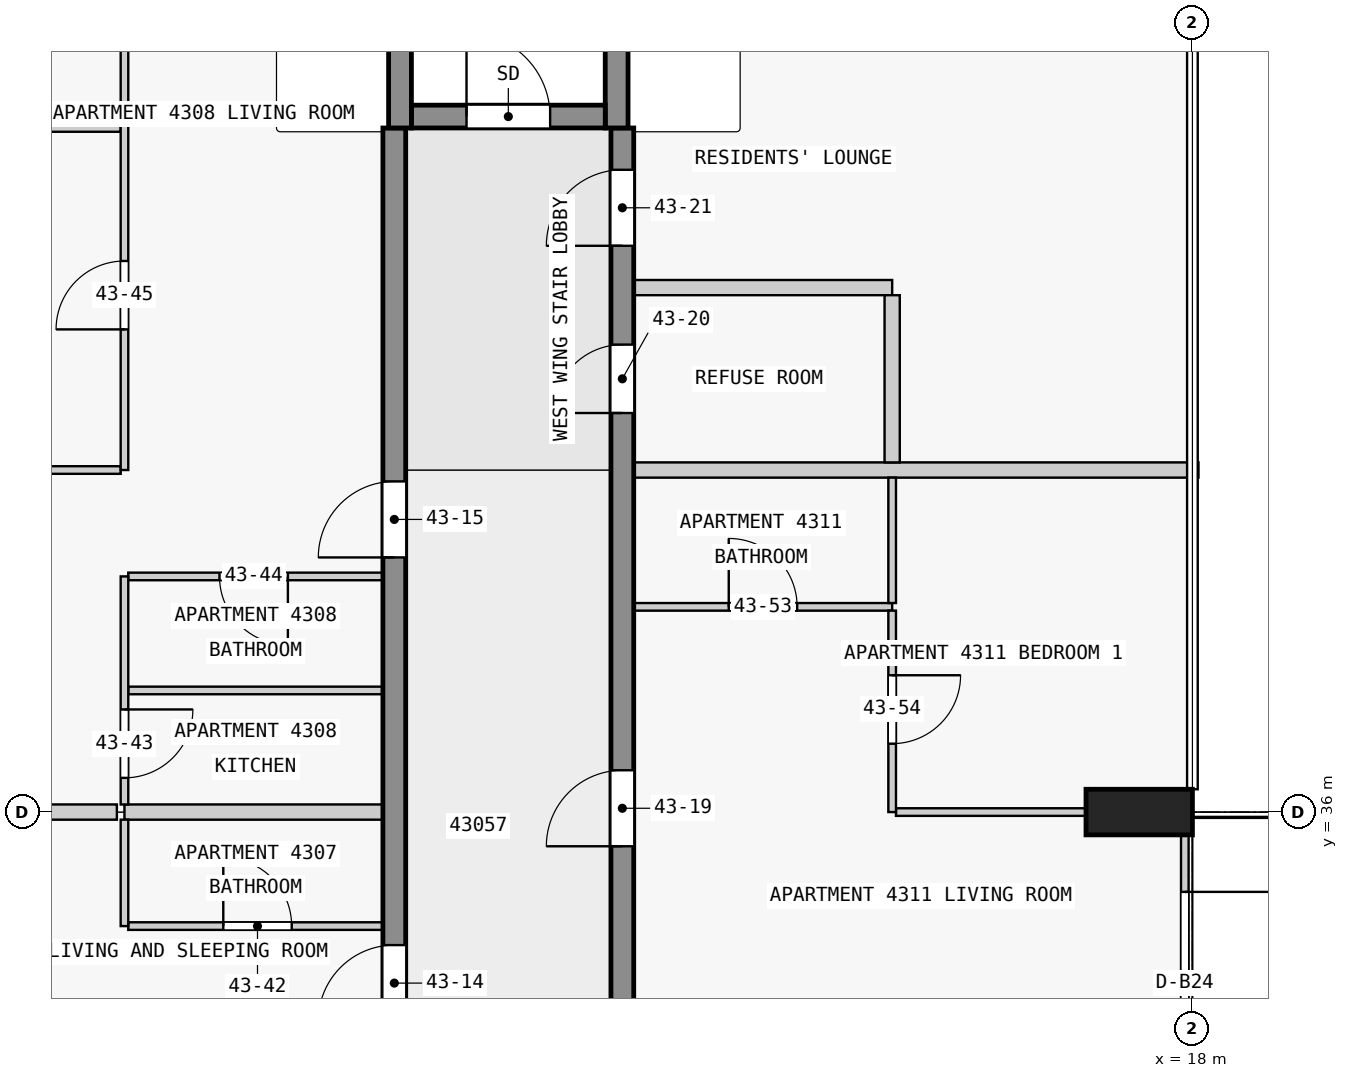
"""IFC4 building model, lengths in metres.
Left out: names, types, materials, properties, quantities, classifications, styles, units other than length and angle.
Written with IfcOpenShell. Run it as: python <this file> out.ifc"""

import sys

from ifc_helpers import new_model, si_unit, direction, frame, frame_2d, origin, origin_2d, place, context, subcontext, project, spatial, rectangle, extrude, element, fill, save


model = new_model("IFC4")
c1 = context("Model", 3, precision=1e-05, world=origin(), true_north=direction((0.0, 1.0)))
c2 = subcontext(c1, "Body", "Model", "MODEL_VIEW")
j1 = project(units=[si_unit("LENGTHUNIT", "METRE"), si_unit("PLANEANGLEUNIT", "RADIAN")], contexts=[c1])
p1 = place(None, origin())
s1 = spatial("IfcSite", under=j1, at=p1, CompositionType="ELEMENT")
p2 = place(p1, origin())
s2 = spatial("IfcBuilding", under=s1, at=p2, CompositionType="ELEMENT")
p3 = place(p2, frame((0.0, 0.0, 167.4)))
s3 = spatial("IfcBuildingStorey", under=s2, at=p3, CompositionType="ELEMENT", Elevation=167.4)
p4 = place(p3, frame((17.3, 36.0, 0.0), z_axis=(0.0, 0.0, 1.0), x_axis=(0.0, 1.0, 0.0)))
e1 = element("IfcColumn", 1, at=p4, inside=s3, PredefinedType="COLUMN", context=c2, shape_type="SweptSolid", body=[
    extrude(rectangle(XDim=0.6, YDim=1.4, at=origin_2d()), origin(), (0.0, 0.0, 1.0), 3.5),
])
p5 = place(p3, frame((7.725, 45.15, 0.0), z_axis=(0.0, 0.0, 1.0), x_axis=(1.0, 0.0, 0.0)))
e2 = element("IfcWall", 2, at=p5, inside=s3, PredefinedType="SHEAR", context=c2, shape_type="SweptSolid", body=[
    extrude(rectangle(XDim=2.55, YDim=0.3, at=frame_2d((1.275, 0.0))), origin(), (0.0, 0.0, 1.0), 3.5),
])
p6 = place(p5, frame((0.725, 0.0, 0.0)))
e3 = element("IfcOpeningElement", 3, at=p6, cuts=e2, PredefinedType="OPENING", context=c2, shape_type="SweptSolid", body=[
    extrude(rectangle(XDim=1.1, YDim=2.1, at=frame_2d((0.55, 1.05))), frame((0.0, 0.16, 0.0), z_axis=(0.0, -1.0, 0.0), x_axis=(1.0, 0.0, 0.0)), (0.0, 0.0, 1.0), 0.32),
])
for number, where, z_axis, x_axis in (
    (4, (7.575, 45.0, 0.0), (0.0, 0.0, 1.0), (0.0, 1.0, 0.0)),
    (5, (10.425, 45.0, 0.0), (0.0, 0.0, 1.0), (0.0, 1.0, 0.0)),
):
    element("IfcWall", number, at=place(p3, frame(where, z_axis=z_axis, x_axis=x_axis)), inside=s3, PredefinedType="SHEAR", context=c2, shape_type="SweptSolid", body=[
        extrude(rectangle(XDim=7.2, YDim=0.3, at=frame_2d((3.6, 0.0))), origin(), (0.0, 0.0, 1.0), 3.5),
    ])
p7 = place(p3, frame((7.5, 18.0, 0.0), z_axis=(0.0, 0.0, 1.0), x_axis=(0.0, 1.0, 0.0)))
e6 = element("IfcWall", 6, at=p7, inside=s3, PredefinedType="SHEAR", context=c2, shape_type="SweptSolid", body=[
    extrude(rectangle(XDim=27.0, YDim=0.3, at=frame_2d((13.5, 0.0))), origin(), (0.0, 0.0, 1.0), 3.25),
])
p8 = place(p7, frame((1.75, 0.0, 0.0)))
e7 = element("IfcOpeningElement", 7, at=p8, cuts=e6, PredefinedType="OPENING", context=c2, shape_type="SweptSolid", body=[
    extrude(rectangle(XDim=1.0, YDim=2.1, at=frame_2d((0.5, 1.05))), frame((0.0, 0.16, 0.0), z_axis=(0.0, -1.0, 0.0), x_axis=(1.0, 0.0, 0.0)), (0.0, 0.0, 1.0), 0.32),
])
p9 = place(p7, frame((6.25, 0.0, 0.0)))
e8 = element("IfcOpeningElement", 8, at=p9, cuts=e6, PredefinedType="OPENING", context=c2, shape_type="SweptSolid", body=[
    extrude(rectangle(XDim=1.0, YDim=2.1, at=frame_2d((0.5, 1.05))), frame((0.0, 0.16, 0.0), z_axis=(0.0, -1.0, 0.0), x_axis=(1.0, 0.0, 0.0)), (0.0, 0.0, 1.0), 0.32),
])
p10 = place(p7, frame((10.75, 0.0, 0.0)))
e9 = element("IfcOpeningElement", 9, at=p10, cuts=e6, PredefinedType="OPENING", context=c2, shape_type="SweptSolid", body=[
    extrude(rectangle(XDim=1.0, YDim=2.1, at=frame_2d((0.5, 1.05))), frame((0.0, 0.16, 0.0), z_axis=(0.0, -1.0, 0.0), x_axis=(1.0, 0.0, 0.0)), (0.0, 0.0, 1.0), 0.32),
])
p11 = place(p7, frame((15.25, 0.0, 0.0)))
e10 = element("IfcOpeningElement", 10, at=p11, cuts=e6, PredefinedType="OPENING", context=c2, shape_type="SweptSolid", body=[
    extrude(rectangle(XDim=1.0, YDim=2.1, at=frame_2d((0.5, 1.05))), frame((0.0, 0.16, 0.0), z_axis=(0.0, -1.0, 0.0), x_axis=(1.0, 0.0, 0.0)), (0.0, 0.0, 1.0), 0.32),
])
p12 = place(p7, frame((21.35, 0.0, 0.0)))
e11 = element("IfcOpeningElement", 11, at=p12, cuts=e6, PredefinedType="OPENING", context=c2, shape_type="SweptSolid", body=[
    extrude(rectangle(XDim=1.0, YDim=2.1, at=frame_2d((0.5, 1.05))), frame((0.0, 0.16, 0.0), z_axis=(0.0, -1.0, 0.0), x_axis=(1.0, 0.0, 0.0)), (0.0, 0.0, 1.0), 0.32),
])
p13 = place(p3, frame((10.5, 18.0, 0.0), z_axis=(0.0, 0.0, 1.0), x_axis=(0.0, 1.0, 0.0)))
e12 = element("IfcWall", 12, at=p13, inside=s3, PredefinedType="SHEAR", context=c2, shape_type="SweptSolid", body=[
    extrude(rectangle(XDim=27.0, YDim=0.3, at=frame_2d((13.5, 0.0))), origin(), (0.0, 0.0, 1.0), 3.25),
])
p14 = place(p13, frame((1.75, 0.0, 0.0)))
e13 = element("IfcOpeningElement", 13, at=p14, cuts=e12, PredefinedType="OPENING", context=c2, shape_type="SweptSolid", body=[
    extrude(rectangle(XDim=1.0, YDim=2.1, at=frame_2d((0.5, 1.05))), frame((0.0, 0.16, 0.0), z_axis=(0.0, -1.0, 0.0), x_axis=(1.0, 0.0, 0.0)), (0.0, 0.0, 1.0), 0.32),
])
p15 = place(p13, frame((6.25, 0.0, 0.0)))
e14 = element("IfcOpeningElement", 14, at=p15, cuts=e12, PredefinedType="OPENING", context=c2, shape_type="SweptSolid", body=[
    extrude(rectangle(XDim=1.0, YDim=2.1, at=frame_2d((0.5, 1.05))), frame((0.0, 0.16, 0.0), z_axis=(0.0, -1.0, 0.0), x_axis=(1.0, 0.0, 0.0)), (0.0, 0.0, 1.0), 0.32),
])
p16 = place(p13, frame((10.35, 0.0, 0.0)))
e15 = element("IfcOpeningElement", 15, at=p16, cuts=e12, PredefinedType="OPENING", context=c2, shape_type="SweptSolid", body=[
    extrude(rectangle(XDim=1.8, YDim=2.1, at=frame_2d((0.9, 1.05))), frame((0.0, 0.16, 0.0), z_axis=(0.0, -1.0, 0.0), x_axis=(1.0, 0.0, 0.0)), (0.0, 0.0, 1.0), 0.32),
])
p17 = place(p13, frame((17.55, 0.0, 0.0)))
e16 = element("IfcOpeningElement", 16, at=p17, cuts=e12, PredefinedType="OPENING", context=c2, shape_type="SweptSolid", body=[
    extrude(rectangle(XDim=1.0, YDim=2.1, at=frame_2d((0.5, 1.05))), frame((0.0, 0.16, 0.0), z_axis=(0.0, -1.0, 0.0), x_axis=(1.0, 0.0, 0.0)), (0.0, 0.0, 1.0), 0.32),
])
p18 = place(p13, frame((23.25, 0.0, 0.0)))
e17 = element("IfcOpeningElement", 17, at=p18, cuts=e12, PredefinedType="OPENING", context=c2, shape_type="SweptSolid", body=[
    extrude(rectangle(XDim=0.9, YDim=2.1, at=frame_2d((0.45, 1.05))), frame((0.0, 0.16, 0.0), z_axis=(0.0, -1.0, 0.0), x_axis=(1.0, 0.0, 0.0)), (0.0, 0.0, 1.0), 0.32),
])
p19 = place(p13, frame((25.45, 0.0, 0.0)))
e18 = element("IfcOpeningElement", 18, at=p19, cuts=e12, PredefinedType="OPENING", context=c2, shape_type="SweptSolid", body=[
    extrude(rectangle(XDim=1.0, YDim=2.1, at=frame_2d((0.5, 1.05))), frame((0.0, 0.16, 0.0), z_axis=(0.0, -1.0, 0.0), x_axis=(1.0, 0.0, 0.0)), (0.0, 0.0, 1.0), 0.32),
])
p20 = place(p3, frame((17.9, 36.0, 0.0), z_axis=(0.0, 0.0, 1.0), x_axis=(0.0, -1.0, 0.0)))
e19 = element("IfcWall", 19, at=p20, inside=s3, PredefinedType="STANDARD", context=c2, shape_type="SweptSolid", body=[
    extrude(rectangle(XDim=4.5, YDim=0.1, at=frame_2d((2.25, 0.0))), origin(), (0.0, 0.0, 1.0), 3.25),
])
p21 = place(p20, frame((1.05, 0.0, 0.0)))
e20 = element("IfcOpeningElement", 20, at=p21, cuts=e19, PredefinedType="OPENING", context=c2, shape_type="SweptSolid", body=[
    extrude(rectangle(XDim=2.4, YDim=2.4, at=frame_2d((1.2, 1.2))), frame((0.0, 0.06, 0.0), z_axis=(0.0, -1.0, 0.0), x_axis=(1.0, 0.0, 0.0)), (0.0, 0.0, 1.0), 0.12),
])
p22 = place(p3, frame((4.0, 34.5, 0.0), z_axis=(0.0, 0.0, 1.0), x_axis=(1.0, 0.0, 0.0)))
e21 = element("IfcWall", 21, at=p22, inside=s3, PredefinedType="PARTITIONING", context=c2, shape_type="SweptSolid", body=[
    extrude(rectangle(XDim=3.35, YDim=0.1, at=frame_2d((1.675, 0.0))), origin(), (0.0, 0.0, 1.0), 3.25),
])
p23 = place(p22, frame((1.25, 0.0, 0.0)))
e22 = element("IfcOpeningElement", 22, at=p23, cuts=e21, PredefinedType="OPENING", context=c2, shape_type="SweptSolid", body=[
    extrude(rectangle(XDim=0.9, YDim=2.1, at=frame_2d((0.45, 1.05))), frame((0.0, 0.06, 0.0), z_axis=(0.0, -1.0, 0.0), x_axis=(1.0, 0.0, 0.0)), (0.0, 0.0, 1.0), 0.12),
])
p24 = place(p3, frame((14.1, 36.0, 0.0), z_axis=(0.0, 0.0, 1.0), x_axis=(1.0, 0.0, 0.0)))
e23 = element("IfcWall", 23, at=p24, inside=s3, PredefinedType="PARTITIONING", context=c2, shape_type="SweptSolid", body=[
    extrude(rectangle(XDim=2.5, YDim=0.1, at=frame_2d((1.25, 0.0))), origin(), (0.0, 0.0, 1.0), 3.25),
])
p25 = place(p3, frame((7.35, 36.0, 0.0), z_axis=(0.0, 0.0, 1.0), x_axis=(-1.0, 0.0, 0.0)))
e24 = element("IfcWall", 24, at=p25, inside=s3, PredefinedType="PARTITIONING", context=c2, shape_type="SweptSolid", body=[
    extrude(rectangle(XDim=3.4, YDim=0.2, at=frame_2d((1.7, 0.0))), origin(), (0.0, 0.0, 1.0), 3.25),
])
p26 = place(p3, frame((1.4, 36.0, 0.0), z_axis=(0.0, 0.0, 1.0), x_axis=(1.0, 0.0, 0.0)))
e25 = element("IfcWall", 25, at=p26, inside=s3, PredefinedType="PARTITIONING", context=c2, shape_type="SweptSolid", body=[
    extrude(rectangle(XDim=2.45, YDim=0.2, at=frame_2d((1.225, 0.0))), origin(), (0.0, 0.0, 1.0), 3.25),
])
p27 = place(p3, frame((7.35, 37.6, 0.0), z_axis=(0.0, 0.0, 1.0), x_axis=(-1.0, 0.0, 0.0)))
e26 = element("IfcWall", 26, at=p27, inside=s3, PredefinedType="PARTITIONING", context=c2, shape_type="SweptSolid", body=[
    extrude(rectangle(XDim=3.35, YDim=0.1, at=frame_2d((1.675, 0.0))), origin(), (0.0, 0.0, 1.0), 3.25),
])
p28 = place(p3, frame((10.65, 38.7, 0.0), z_axis=(0.0, 0.0, 1.0), x_axis=(1.0, 0.0, 0.0)))
e27 = element("IfcWall", 27, at=p28, inside=s3, PredefinedType="PARTITIONING", context=c2, shape_type="SweptSolid", body=[
    extrude(rectangle(XDim=3.4, YDim=0.1, at=frame_2d((1.7, 0.0))), origin(), (0.0, 0.0, 1.0), 3.25),
])
p29 = place(p28, frame((1.25, 0.0, 0.0)))
e28 = element("IfcOpeningElement", 28, at=p29, cuts=e27, PredefinedType="OPENING", context=c2, shape_type="SweptSolid", body=[
    extrude(rectangle(XDim=0.9, YDim=2.1, at=frame_2d((0.45, 1.05))), frame((0.0, 0.06, 0.0), z_axis=(0.0, -1.0, 0.0), x_axis=(1.0, 0.0, 0.0)), (0.0, 0.0, 1.0), 0.12),
])
p30 = place(p3, frame((7.35, 39.1, 0.0), z_axis=(0.0, 0.0, 1.0), x_axis=(-1.0, 0.0, 0.0)))
e29 = element("IfcWall", 29, at=p30, inside=s3, PredefinedType="PARTITIONING", context=c2, shape_type="SweptSolid", body=[
    extrude(rectangle(XDim=3.35, YDim=0.1, at=frame_2d((1.675, 0.0))), origin(), (0.0, 0.0, 1.0), 3.25),
])
p31 = place(p30, frame((1.25, 0.0, 0.0)))
e30 = element("IfcOpeningElement", 30, at=p31, cuts=e29, PredefinedType="OPENING", context=c2, shape_type="SweptSolid", body=[
    extrude(rectangle(XDim=0.9, YDim=2.1, at=frame_2d((0.45, 1.05))), frame((0.0, 0.06, 0.0), z_axis=(0.0, -1.0, 0.0), x_axis=(1.0, 0.0, 0.0)), (0.0, 0.0, 1.0), 0.12),
])
p32 = place(p3, frame((0.15, 40.5, 0.0), z_axis=(0.0, 0.0, 1.0), x_axis=(1.0, 0.0, 0.0)))
e31 = element("IfcWall", 31, at=p32, inside=s3, PredefinedType="PARTITIONING", context=c2, shape_type="SweptSolid", body=[
    extrude(rectangle(XDim=3.75, YDim=0.1, at=frame_2d((1.875, 0.0))), origin(), (0.0, 0.0, 1.0), 3.25),
])
p33 = place(p3, frame((18.08, 40.5, 0.0), z_axis=(0.0, 0.0, 1.0), x_axis=(-1.0, 0.0, 0.0)))
e32 = element("IfcWall", 32, at=p33, inside=s3, PredefinedType="PARTITIONING", context=c2, shape_type="SweptSolid", body=[
    extrude(rectangle(XDim=7.43, YDim=0.2, at=frame_2d((3.715, 0.0))), origin(), (0.0, 0.0, 1.0), 3.25),
])
p34 = place(p3, frame((14.05, 42.9, 0.0), z_axis=(0.0, 0.0, 1.0), x_axis=(-1.0, 0.0, 0.0)))
e33 = element("IfcWall", 33, at=p34, inside=s3, PredefinedType="PARTITIONING", context=c2, shape_type="SweptSolid", body=[
    extrude(rectangle(XDim=3.4, YDim=0.2, at=frame_2d((1.7, 0.0))), origin(), (0.0, 0.0, 1.0), 3.25),
])
p35 = place(p3, frame((3.9, 45.0, 0.0), z_axis=(0.0, 0.0, 1.0), x_axis=(-1.0, 0.0, 0.0)))
e34 = element("IfcWall", 34, at=p35, inside=s3, PredefinedType="PARTITIONING", context=c2, shape_type="SweptSolid", body=[
    extrude(rectangle(XDim=3.75, YDim=0.1, at=frame_2d((1.875, 0.0))), origin(), (0.0, 0.0, 1.0), 3.25),
])
p36 = place(p3, frame((3.95, 35.9, 0.0), z_axis=(0.0, 0.0, 1.0), x_axis=(0.0, -1.0, 0.0)))
e35 = element("IfcWall", 35, at=p36, inside=s3, PredefinedType="PARTITIONING", context=c2, shape_type="SweptSolid", body=[
    extrude(rectangle(XDim=1.4, YDim=0.1, at=frame_2d((0.7, 0.0))), origin(), (0.0, 0.0, 1.0), 3.25),
])
p37 = place(p3, frame((3.95, 39.1, 0.0), z_axis=(0.0, 0.0, 1.0), x_axis=(0.0, -1.0, 0.0)))
e36 = element("IfcWall", 36, at=p37, inside=s3, PredefinedType="PARTITIONING", context=c2, shape_type="SweptSolid", body=[
    extrude(rectangle(XDim=3.0, YDim=0.1, at=frame_2d((1.5, 0.0))), origin(), (0.0, 0.0, 1.0), 3.25),
])
p38 = place(p37, frame((1.75, 0.0, 0.0)))
e37 = element("IfcOpeningElement", 37, at=p38, cuts=e36, PredefinedType="OPENING", context=c2, shape_type="SweptSolid", body=[
    extrude(rectangle(XDim=0.9, YDim=2.1, at=frame_2d((0.45, 1.05))), frame((0.0, 0.06, 0.0), z_axis=(0.0, -1.0, 0.0), x_axis=(1.0, 0.0, 0.0)), (0.0, 0.0, 1.0), 0.12),
])
p39 = place(p3, frame((3.95, 40.5, 0.0), z_axis=(0.0, 0.0, 1.0), x_axis=(0.0, 1.0, 0.0)))
e38 = element("IfcWall", 38, at=p39, inside=s3, PredefinedType="PARTITIONING", context=c2, shape_type="SweptSolid", body=[
    extrude(rectangle(XDim=13.58, YDim=0.1, at=frame_2d((6.79, 0.0))), origin(), (0.0, 0.0, 1.0), 3.25),
])
p40 = place(p39, frame((1.85, 0.0, 0.0)))
e39 = element("IfcOpeningElement", 39, at=p40, cuts=e38, PredefinedType="OPENING", context=c2, shape_type="SweptSolid", body=[
    extrude(rectangle(XDim=0.9, YDim=2.1, at=frame_2d((0.45, 1.05))), frame((0.0, 0.06, 0.0), z_axis=(0.0, -1.0, 0.0), x_axis=(1.0, 0.0, 0.0)), (0.0, 0.0, 1.0), 0.12),
])
p41 = place(p39, frame((6.35, 0.0, 0.0)))
e40 = element("IfcOpeningElement", 40, at=p41, cuts=e38, PredefinedType="OPENING", context=c2, shape_type="SweptSolid", body=[
    extrude(rectangle(XDim=0.9, YDim=2.1, at=frame_2d((0.45, 1.05))), frame((0.0, 0.06, 0.0), z_axis=(0.0, -1.0, 0.0), x_axis=(1.0, 0.0, 0.0)), (0.0, 0.0, 1.0), 0.12),
])
p42 = place(p39, frame((10.75, 0.0, 0.0)))
e41 = element("IfcOpeningElement", 41, at=p42, cuts=e38, PredefinedType="OPENING", context=c2, shape_type="SweptSolid", body=[
    extrude(rectangle(XDim=0.9, YDim=2.1, at=frame_2d((0.45, 1.05))), frame((0.0, 0.06, 0.0), z_axis=(0.0, -1.0, 0.0), x_axis=(1.0, 0.0, 0.0)), (0.0, 0.0, 1.0), 0.12),
])
p43 = place(p3, frame((14.05, 38.65, 0.0), z_axis=(0.0, 0.0, 1.0), x_axis=(0.0, -1.0, 0.0)))
e42 = element("IfcWall", 42, at=p43, inside=s3, PredefinedType="PARTITIONING", context=c2, shape_type="SweptSolid", body=[
    extrude(rectangle(XDim=2.65, YDim=0.1, at=frame_2d((1.325, 0.0))), origin(), (0.0, 0.0, 1.0), 3.25),
])
p44 = place(p43, frame((0.85, 0.0, 0.0)))
e43 = element("IfcOpeningElement", 43, at=p44, cuts=e42, PredefinedType="OPENING", context=c2, shape_type="SweptSolid", body=[
    extrude(rectangle(XDim=0.9, YDim=2.1, at=frame_2d((0.45, 1.05))), frame((0.0, 0.06, 0.0), z_axis=(0.0, -1.0, 0.0), x_axis=(1.0, 0.0, 0.0)), (0.0, 0.0, 1.0), 0.12),
])
p45 = place(p3, frame((14.05, 38.75, 0.0), z_axis=(0.0, 0.0, 1.0), x_axis=(0.0, 1.0, 0.0)))
e44 = element("IfcWall", 44, at=p45, inside=s3, PredefinedType="PARTITIONING", context=c2, shape_type="SweptSolid", body=[
    extrude(rectangle(XDim=1.65, YDim=0.1, at=frame_2d((0.825, 0.0))), origin(), (0.0, 0.0, 1.0), 3.25),
])
p46 = place(p3, frame((14.05, 40.6, 0.0), z_axis=(0.0, 0.0, 1.0), x_axis=(0.0, 1.0, 0.0)))
e45 = element("IfcWall", 45, at=p46, inside=s3, PredefinedType="PARTITIONING", context=c2, shape_type="SweptSolid", body=[
    extrude(rectangle(XDim=2.2, YDim=0.2, at=frame_2d((1.1, 0.0))), origin(), (0.0, 0.0, 1.0), 3.25),
])
p47 = place(p21, origin())
e46 = element("IfcDoor", 46, at=p47, inside=s3, OperationType="SINGLE_SWING_LEFT", PredefinedType="DOOR", context=c2, shape_type="SweptSolid", body=[
    extrude(rectangle(XDim=2.4, YDim=2.4, at=frame_2d((1.2, 1.2))), frame((0.0, 0.025, 0.0), z_axis=(0.0, -1.0, 0.0), x_axis=(1.0, 0.0, 0.0)), (0.0, 0.0, 1.0), 0.05),
])
fill(e20, e46)
p48 = place(p6, origin())
e47 = element("IfcDoor", 47, at=p48, inside=s3, OperationType="SINGLE_SWING_LEFT", PredefinedType="DOOR", context=c2, shape_type="SweptSolid", body=[
    extrude(rectangle(XDim=1.1, YDim=2.1, at=frame_2d((0.55, 1.05))), frame((0.0, 0.025, 0.0), z_axis=(0.0, -1.0, 0.0), x_axis=(1.0, 0.0, 0.0)), (0.0, 0.0, 1.0), 0.05),
])
fill(e3, e47)
p49 = place(p11, origin())
e48 = element("IfcDoor", 48, at=p49, inside=s3, OperationType="SINGLE_SWING_RIGHT", PredefinedType="DOOR", context=c2, shape_type="SweptSolid", body=[
    extrude(rectangle(XDim=1.0, YDim=2.1, at=frame_2d((0.5, 1.05))), frame((0.0, 0.025, 0.0), z_axis=(0.0, -1.0, 0.0), x_axis=(1.0, 0.0, 0.0)), (0.0, 0.0, 1.0), 0.05),
])
fill(e10, e48)
p50 = place(p12, origin())
e49 = element("IfcDoor", 49, at=p50, inside=s3, OperationType="SINGLE_SWING_RIGHT", PredefinedType="DOOR", context=c2, shape_type="SweptSolid", body=[
    extrude(rectangle(XDim=1.0, YDim=2.1, at=frame_2d((0.5, 1.05))), frame((0.0, 0.025, 0.0), z_axis=(0.0, -1.0, 0.0), x_axis=(1.0, 0.0, 0.0)), (0.0, 0.0, 1.0), 0.05),
])
fill(e11, e49)
p51 = place(p17, origin())
e50 = element("IfcDoor", 50, at=p51, inside=s3, OperationType="SINGLE_SWING_RIGHT", PredefinedType="DOOR", context=c2, shape_type="SweptSolid", body=[
    extrude(rectangle(XDim=1.0, YDim=2.1, at=frame_2d((0.5, 1.05))), frame((0.0, 0.025, 0.0), z_axis=(0.0, -1.0, 0.0), x_axis=(1.0, 0.0, 0.0)), (0.0, 0.0, 1.0), 0.05),
])
fill(e16, e50)
p52 = place(p18, origin())
e51 = element("IfcDoor", 51, at=p52, inside=s3, OperationType="SINGLE_SWING_RIGHT", PredefinedType="DOOR", context=c2, shape_type="SweptSolid", body=[
    extrude(rectangle(XDim=0.9, YDim=2.1, at=frame_2d((0.45, 1.05))), frame((0.0, 0.025, 0.0), z_axis=(0.0, -1.0, 0.0), x_axis=(1.0, 0.0, 0.0)), (0.0, 0.0, 1.0), 0.05),
])
fill(e17, e51)
p53 = place(p19, origin())
e52 = element("IfcDoor", 52, at=p53, inside=s3, OperationType="SINGLE_SWING_RIGHT", PredefinedType="DOOR", context=c2, shape_type="SweptSolid", body=[
    extrude(rectangle(XDim=1.0, YDim=2.1, at=frame_2d((0.5, 1.05))), frame((0.0, 0.025, 0.0), z_axis=(0.0, -1.0, 0.0), x_axis=(1.0, 0.0, 0.0)), (0.0, 0.0, 1.0), 0.05),
])
fill(e18, e52)
p54 = place(p23, origin())
e53 = element("IfcDoor", 53, at=p54, inside=s3, OperationType="SINGLE_SWING_RIGHT", PredefinedType="DOOR", context=c2, shape_type="SweptSolid", body=[
    extrude(rectangle(XDim=0.9, YDim=2.1, at=frame_2d((0.45, 1.05))), frame((0.0, 0.025, 0.0), z_axis=(0.0, -1.0, 0.0), x_axis=(1.0, 0.0, 0.0)), (0.0, 0.0, 1.0), 0.05),
])
fill(e22, e53)
p55 = place(p38, origin())
e54 = element("IfcDoor", 54, at=p55, inside=s3, OperationType="SINGLE_SWING_RIGHT", PredefinedType="DOOR", context=c2, shape_type="SweptSolid", body=[
    extrude(rectangle(XDim=0.9, YDim=2.1, at=frame_2d((0.45, 1.05))), frame((0.0, 0.025, 0.0), z_axis=(0.0, -1.0, 0.0), x_axis=(1.0, 0.0, 0.0)), (0.0, 0.0, 1.0), 0.05),
])
fill(e37, e54)
p56 = place(p31, origin())
e55 = element("IfcDoor", 55, at=p56, inside=s3, OperationType="SINGLE_SWING_RIGHT", PredefinedType="DOOR", context=c2, shape_type="SweptSolid", body=[
    extrude(rectangle(XDim=0.9, YDim=2.1, at=frame_2d((0.45, 1.05))), frame((0.0, 0.025, 0.0), z_axis=(0.0, -1.0, 0.0), x_axis=(1.0, 0.0, 0.0)), (0.0, 0.0, 1.0), 0.05),
])
fill(e30, e55)
p57 = place(p40, origin())
e56 = element("IfcDoor", 56, at=p57, inside=s3, OperationType="SINGLE_SWING_LEFT", PredefinedType="DOOR", context=c2, shape_type="SweptSolid", body=[
    extrude(rectangle(XDim=0.9, YDim=2.1, at=frame_2d((0.45, 1.05))), frame((0.0, 0.025, 0.0), z_axis=(0.0, -1.0, 0.0), x_axis=(1.0, 0.0, 0.0)), (0.0, 0.0, 1.0), 0.05),
])
fill(e39, e56)
p58 = place(p29, origin())
e57 = element("IfcDoor", 57, at=p58, inside=s3, OperationType="SINGLE_SWING_LEFT", PredefinedType="DOOR", context=c2, shape_type="SweptSolid", body=[
    extrude(rectangle(XDim=0.9, YDim=2.1, at=frame_2d((0.45, 1.05))), frame((0.0, 0.025, 0.0), z_axis=(0.0, -1.0, 0.0), x_axis=(1.0, 0.0, 0.0)), (0.0, 0.0, 1.0), 0.05),
])
fill(e28, e57)
p59 = place(p44, origin())
e58 = element("IfcDoor", 58, at=p59, inside=s3, OperationType="SINGLE_SWING_LEFT", PredefinedType="DOOR", context=c2, shape_type="SweptSolid", body=[
    extrude(rectangle(XDim=0.9, YDim=2.1, at=frame_2d((0.45, 1.05))), frame((0.0, 0.025, 0.0), z_axis=(0.0, -1.0, 0.0), x_axis=(1.0, 0.0, 0.0)), (0.0, 0.0, 1.0), 0.05),
])
fill(e43, e58)
save(model, sys.argv[1])
